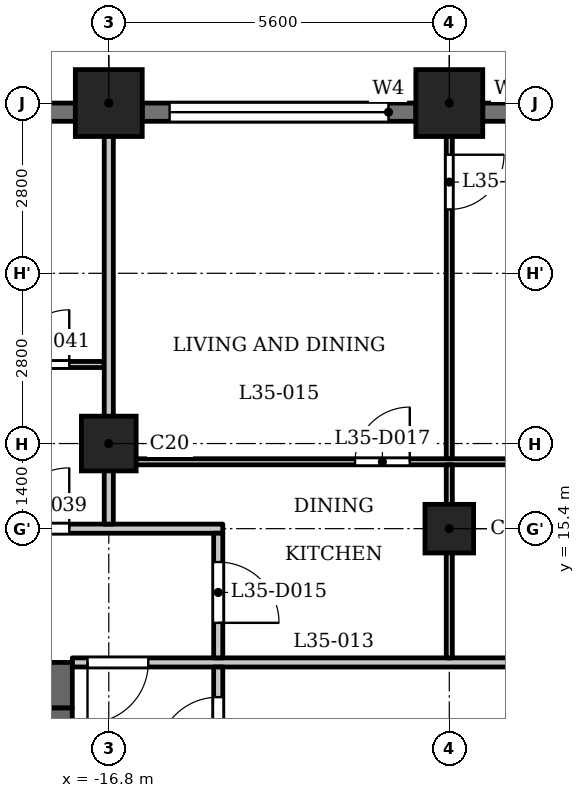
"""IFC4 building model, lengths in metres.
Left out: names, types, materials, properties, quantities, classifications, styles, units other than length and angle.
Written with IfcOpenShell. Run it as: python <this file> out.ifc"""

import sys

from ifc_helpers import new_model, si_unit, direction, frame, frame_2d, origin, origin_2d, place, context, subcontext, project, spatial, rectangle, extrude, element, fill, save


model = new_model("IFC4")
c1 = context("Model", 3, precision=1e-05, world=origin(), true_north=direction((0.0, 1.0)))
c2 = subcontext(c1, "Body", "Model", "MODEL_VIEW")
j1 = project(units=[si_unit("LENGTHUNIT", "METRE"), si_unit("PLANEANGLEUNIT", "RADIAN")], contexts=[c1])
p1 = place(None, origin())
s1 = spatial("IfcSite", under=j1, at=p1, CompositionType="ELEMENT")
p2 = place(p1, origin())
s2 = spatial("IfcBuilding", under=s1, at=p2, CompositionType="ELEMENT")
p3 = place(p2, frame((0.0, 0.0, 139.6)))
s3 = spatial("IfcBuildingStorey", under=s2, at=p3, CompositionType="ELEMENT", Elevation=139.6)
for number, where, z_axis, x_axis in (
    (1, (-11.2, 22.4, 0.0), (0.0, 0.0, 1.0), (1.0, 0.0, 0.0)),
    (2, (-16.8, 22.4, 0.0), (0.0, 0.0, 1.0), (1.0, 0.0, 0.0)),
):
    element("IfcColumn", number, at=place(p3, frame(where, z_axis=z_axis, x_axis=x_axis)), inside=s3, PredefinedType="COLUMN", context=c2, shape_type="SweptSolid", body=[
        extrude(rectangle(XDim=1.1, YDim=1.1, at=origin_2d()), origin(), (0.0, 0.0, 1.0), 3.5),
    ])
p4 = place(p3, frame((-16.8, 16.8, 0.0), z_axis=(0.0, 0.0, 1.0), x_axis=(1.0, 0.0, 0.0)))
e3 = element("IfcColumn", 3, at=p4, inside=s3, PredefinedType="COLUMN", context=c2, shape_type="SweptSolid", body=[
    extrude(rectangle(XDim=0.9, YDim=0.9, at=origin_2d()), origin(), (0.0, 0.0, 1.0), 3.5),
])
p5 = place(p3, frame((-11.2, 15.4, 0.0), z_axis=(0.0, 0.0, 1.0), x_axis=(1.0, 0.0, 0.0)))
e4 = element("IfcColumn", 4, at=p5, inside=s3, PredefinedType="COLUMN", context=c2, shape_type="SweptSolid", body=[
    extrude(rectangle(XDim=0.8, YDim=0.8, at=origin_2d()), origin(), (0.0, 0.0, 1.0), 3.5),
])
p6 = place(p3, frame((-6.15, 22.25, 0.0), z_axis=(0.0, 0.0, 1.0), x_axis=(-1.0, 0.0, 0.0)))
e5 = element("IfcWall", 5, at=p6, inside=s3, PredefinedType="SOLIDWALL", context=c2, shape_type="SweptSolid", body=[
    extrude(rectangle(XDim=4.5, YDim=0.3, at=frame_2d((2.25, 0.0))), origin(), (0.0, 0.0, 1.0), 2.45),
])
p7 = place(p6, frame((0.45, 0.0, 1.2)))
e6 = element("IfcOpeningElement", 6, at=p7, cuts=e5, PredefinedType="OPENING", context=c2, shape_type="SweptSolid", body=[
    extrude(rectangle(XDim=3.6, YDim=0.95, at=frame_2d((1.8, 0.475))), frame((0.0, 0.16, 0.0), z_axis=(0.0, -1.0, 0.0), x_axis=(1.0, 0.0, 0.0)), (0.0, 0.0, 1.0), 0.32),
])
p8 = place(p3, frame((-11.75, 22.25, 0.0), z_axis=(0.0, 0.0, 1.0), x_axis=(-1.0, 0.0, 0.0)))
e7 = element("IfcWall", 7, at=p8, inside=s3, PredefinedType="SOLIDWALL", context=c2, shape_type="SweptSolid", body=[
    extrude(rectangle(XDim=4.5, YDim=0.3, at=frame_2d((2.25, 0.0))), origin(), (0.0, 0.0, 1.0), 2.45),
])
p9 = place(p8, frame((0.45, 0.0, 1.2)))
e8 = element("IfcOpeningElement", 8, at=p9, cuts=e7, PredefinedType="OPENING", context=c2, shape_type="SweptSolid", body=[
    extrude(rectangle(XDim=3.6, YDim=0.95, at=frame_2d((1.8, 0.475))), frame((0.0, 0.16, 0.0), z_axis=(0.0, -1.0, 0.0), x_axis=(1.0, 0.0, 0.0)), (0.0, 0.0, 1.0), 0.32),
])
p10 = place(p3, frame((-17.35, 22.25, 0.0), z_axis=(0.0, 0.0, 1.0), x_axis=(-1.0, 0.0, 0.0)))
e9 = element("IfcWall", 9, at=p10, inside=s3, PredefinedType="SOLIDWALL", context=c2, shape_type="SweptSolid", body=[
    extrude(rectangle(XDim=2.65, YDim=0.3, at=frame_2d((1.325, 0.0))), origin(), (0.0, 0.0, 1.0), 2.45),
])
p11 = place(p10, frame((0.425, 0.0, 0.9)))
e10 = element("IfcOpeningElement", 10, at=p11, cuts=e9, PredefinedType="OPENING", context=c2, shape_type="SweptSolid", body=[
    extrude(rectangle(XDim=1.8, YDim=1.25, at=frame_2d((0.9, 0.625))), frame((0.0, 0.16, 0.0), z_axis=(0.0, -1.0, 0.0), x_axis=(1.0, 0.0, 0.0)), (0.0, 0.0, 1.0), 0.32),
])
p12 = place(p3, frame((-17.4, 12.825, 0.0), z_axis=(0.0, 0.0, 1.0), x_axis=(-1.0, 0.0, 0.0)))
e11 = element("IfcWall", 11, at=p12, inside=s3, PredefinedType="SHEAR", context=c2, shape_type="SweptSolid", body=[
    extrude(rectangle(XDim=10.4, YDim=0.75, at=frame_2d((5.2, 0.0))), origin(), (0.0, 0.0, 1.0), 3.2),
])
p13 = place(p3, frame((-17.6, -12.45, 0.0), z_axis=(0.0, 0.0, 1.0), x_axis=(0.0, 1.0, 0.0)))
e12 = element("IfcWall", 12, at=p13, inside=s3, PredefinedType="SHEAR", context=c2, shape_type="SweptSolid", body=[
    extrude(rectangle(XDim=24.9, YDim=0.4, at=frame_2d((12.45, 0.0))), origin(), (0.0, 0.0, 1.0), 3.2),
])
p14 = place(p13, frame((8.65, 0.0, 0.0)))
e13 = element("IfcOpeningElement", 13, at=p14, cuts=e12, PredefinedType="OPENING", context=c2, shape_type="SweptSolid", body=[
    extrude(rectangle(XDim=0.9, YDim=2.1, at=frame_2d((0.45, 1.05))), frame((0.0, 0.21, 0.0), z_axis=(0.0, -1.0, 0.0), x_axis=(1.0, 0.0, 0.0)), (0.0, 0.0, 1.0), 0.42),
])
p15 = place(p13, frame((15.6, 0.0, 0.0)))
e14 = element("IfcOpeningElement", 14, at=p15, cuts=e12, PredefinedType="OPENING", context=c2, shape_type="SweptSolid", body=[
    extrude(rectangle(XDim=1.1, YDim=2.1, at=frame_2d((0.55, 1.05))), frame((0.0, 0.21, 0.0), z_axis=(0.0, -1.0, 0.0), x_axis=(1.0, 0.0, 0.0)), (0.0, 0.0, 1.0), 0.42),
])
p16 = place(p13, frame((18.0, 0.0, 0.0)))
e15 = element("IfcOpeningElement", 15, at=p16, cuts=e12, PredefinedType="OPENING", context=c2, shape_type="SweptSolid", body=[
    extrude(rectangle(XDim=1.1, YDim=2.1, at=frame_2d((0.55, 1.05))), frame((0.0, 0.21, 0.0), z_axis=(0.0, -1.0, 0.0), x_axis=(1.0, 0.0, 0.0)), (0.0, 0.0, 1.0), 0.42),
])
p17 = place(p13, frame((23.025, 0.0, 0.0)))
e16 = element("IfcOpeningElement", 16, at=p17, cuts=e12, PredefinedType="OPENING", context=c2, shape_type="SweptSolid", body=[
    extrude(rectangle(XDim=1.1, YDim=2.1, at=frame_2d((0.55, 1.05))), frame((0.0, 0.21, 0.0), z_axis=(0.0, -1.0, 0.0), x_axis=(1.0, 0.0, 0.0)), (0.0, 0.0, 1.0), 0.42),
])
p18 = place(p13, frame((0.775, 0.0, 0.0)))
e17 = element("IfcOpeningElement", 17, at=p18, cuts=e12, PredefinedType="OPENING", context=c2, shape_type="SweptSolid", body=[
    extrude(rectangle(XDim=1.1, YDim=2.1, at=frame_2d((0.55, 1.05))), frame((0.0, 0.21, 0.0), z_axis=(0.0, -1.0, 0.0), x_axis=(1.0, 0.0, 0.0)), (0.0, 0.0, 1.0), 0.42),
])
p19 = place(p13, frame((12.925, 0.0, 0.0)))
e18 = element("IfcOpeningElement", 18, at=p19, cuts=e12, PredefinedType="OPENING", context=c2, shape_type="SweptSolid", body=[
    extrude(rectangle(XDim=1.8, YDim=2.1, at=frame_2d((0.9, 1.05))), frame((0.0, 0.21, 0.0), z_axis=(0.0, -1.0, 0.0), x_axis=(1.0, 0.0, 0.0)), (0.0, 0.0, 1.0), 0.42),
])
p20 = place(p3, frame((-17.4, 13.2, 0.0), z_axis=(0.0, 0.0, 1.0), x_axis=(1.0, 0.0, 0.0)))
e19 = element("IfcWall", 19, at=p20, inside=s3, PredefinedType="PARTITIONING", context=c2, shape_type="SweptSolid", body=[
    extrude(rectangle(XDim=34.8, YDim=0.15, at=frame_2d((17.4, 0.0))), origin(), (0.0, 0.0, 1.0), 3.2),
])
p21 = place(p20, frame((0.25, 0.0, 0.0)))
e20 = element("IfcOpeningElement", 20, at=p21, cuts=e19, PredefinedType="OPENING", context=c2, shape_type="SweptSolid", body=[
    extrude(rectangle(XDim=1.0, YDim=2.1, at=frame_2d((0.5, 1.05))), frame((0.0, 0.085, 0.0), z_axis=(0.0, -1.0, 0.0), x_axis=(1.0, 0.0, 0.0)), (0.0, 0.0, 1.0), 0.17),
])
p22 = place(p20, frame((33.65, 0.0, 0.0)))
e21 = element("IfcOpeningElement", 21, at=p22, cuts=e19, PredefinedType="OPENING", context=c2, shape_type="SweptSolid", body=[
    extrude(rectangle(XDim=1.0, YDim=2.1, at=frame_2d((0.5, 1.05))), frame((0.0, 0.085, 0.0), z_axis=(0.0, -1.0, 0.0), x_axis=(1.0, 0.0, 0.0)), (0.0, 0.0, 1.0), 0.17),
])
p23 = place(p20, frame((15.75, 0.0, 0.0)))
e22 = element("IfcOpeningElement", 22, at=p23, cuts=e19, PredefinedType="OPENING", context=c2, shape_type="SweptSolid", body=[
    extrude(rectangle(XDim=1.0, YDim=2.1, at=frame_2d((0.5, 1.05))), frame((0.0, 0.085, 0.0), z_axis=(0.0, -1.0, 0.0), x_axis=(1.0, 0.0, 0.0)), (0.0, 0.0, 1.0), 0.17),
])
p24 = place(p20, frame((19.35, 0.0, 0.0)))
e23 = element("IfcOpeningElement", 23, at=p24, cuts=e19, PredefinedType="OPENING", context=c2, shape_type="SweptSolid", body=[
    extrude(rectangle(XDim=1.0, YDim=2.1, at=frame_2d((0.5, 1.05))), frame((0.0, 0.085, 0.0), z_axis=(0.0, -1.0, 0.0), x_axis=(1.0, 0.0, 0.0)), (0.0, 0.0, 1.0), 0.17),
])
p25 = place(p20, frame((26.95, 0.0, 0.0)))
e24 = element("IfcOpeningElement", 24, at=p25, cuts=e19, PredefinedType="OPENING", context=c2, shape_type="SweptSolid", body=[
    extrude(rectangle(XDim=1.0, YDim=2.1, at=frame_2d((0.5, 1.05))), frame((0.0, 0.085, 0.0), z_axis=(0.0, -1.0, 0.0), x_axis=(1.0, 0.0, 0.0)), (0.0, 0.0, 1.0), 0.17),
])
p26 = place(p20, frame((29.75, 0.0, 0.0)))
e25 = element("IfcOpeningElement", 25, at=p26, cuts=e19, PredefinedType="OPENING", context=c2, shape_type="SweptSolid", body=[
    extrude(rectangle(XDim=1.0, YDim=2.1, at=frame_2d((0.5, 1.05))), frame((0.0, 0.085, 0.0), z_axis=(0.0, -1.0, 0.0), x_axis=(1.0, 0.0, 0.0)), (0.0, 0.0, 1.0), 0.17),
])
p27 = place(p3, frame((-27.484, 15.4, 0.0), z_axis=(0.0, 0.0, 1.0), x_axis=(1.0, 0.0, 0.0)))
e26 = element("IfcWall", 26, at=p27, inside=s3, PredefinedType="PARTITIONING", context=c2, shape_type="SweptSolid", body=[
    extrude(rectangle(XDim=12.559, YDim=0.15, at=frame_2d((6.279, 0.0))), origin(), (0.0, 0.0, 1.0), 3.2),
])
p28 = place(p27, frame((9.034, 0.0, 0.0)))
e27 = element("IfcOpeningElement", 27, at=p28, cuts=e26, PredefinedType="OPENING", context=c2, shape_type="SweptSolid", body=[
    extrude(rectangle(XDim=1.0, YDim=2.1, at=frame_2d((0.5, 1.05))), frame((0.0, 0.085, 0.0), z_axis=(0.0, -1.0, 0.0), x_axis=(1.0, 0.0, 0.0)), (0.0, 0.0, 1.0), 0.17),
])
p29 = place(p3, frame((-16.725, 16.5, 0.0), z_axis=(0.0, 0.0, 1.0), x_axis=(1.0, 0.0, 0.0)))
e28 = element("IfcWall", 28, at=p29, inside=s3, PredefinedType="PARTITIONING", context=c2, shape_type="SweptSolid", body=[
    extrude(rectangle(XDim=33.45, YDim=0.1, at=frame_2d((16.725, 0.0))), origin(), (0.0, 0.0, 1.0), 3.2),
])
p30 = place(p29, frame((9.675, 0.0, 0.0)))
e29 = element("IfcOpeningElement", 29, at=p30, cuts=e28, PredefinedType="OPENING", context=c2, shape_type="SweptSolid", body=[
    extrude(rectangle(XDim=0.8, YDim=2.1, at=frame_2d((0.4, 1.05))), frame((0.0, 0.06, 0.0), z_axis=(0.0, -1.0, 0.0), x_axis=(1.0, 0.0, 0.0)), (0.0, 0.0, 1.0), 0.12),
])
p31 = place(p29, frame((3.975, 0.0, 0.0)))
e30 = element("IfcOpeningElement", 30, at=p31, cuts=e28, PredefinedType="OPENING", context=c2, shape_type="SweptSolid", body=[
    extrude(rectangle(XDim=0.9, YDim=2.1, at=frame_2d((0.45, 1.05))), frame((0.0, 0.06, 0.0), z_axis=(0.0, -1.0, 0.0), x_axis=(1.0, 0.0, 0.0)), (0.0, 0.0, 1.0), 0.12),
])
p32 = place(p29, frame((12.025, 0.0, 0.0)))
e31 = element("IfcOpeningElement", 31, at=p32, cuts=e28, PredefinedType="OPENING", context=c2, shape_type="SweptSolid", body=[
    extrude(rectangle(XDim=0.8, YDim=2.1, at=frame_2d((0.4, 1.05))), frame((0.0, 0.06, 0.0), z_axis=(0.0, -1.0, 0.0), x_axis=(1.0, 0.0, 0.0)), (0.0, 0.0, 1.0), 0.12),
])
p33 = place(p29, frame((15.175, 0.0, 0.0)))
e32 = element("IfcOpeningElement", 32, at=p33, cuts=e28, PredefinedType="OPENING", context=c2, shape_type="SweptSolid", body=[
    extrude(rectangle(XDim=0.9, YDim=2.1, at=frame_2d((0.45, 1.05))), frame((0.0, 0.06, 0.0), z_axis=(0.0, -1.0, 0.0), x_axis=(1.0, 0.0, 0.0)), (0.0, 0.0, 1.0), 0.12),
])
p34 = place(p29, frame((20.975, 0.0, 0.0)))
e33 = element("IfcOpeningElement", 33, at=p34, cuts=e28, PredefinedType="OPENING", context=c2, shape_type="SweptSolid", body=[
    extrude(rectangle(XDim=0.8, YDim=2.1, at=frame_2d((0.4, 1.05))), frame((0.0, 0.06, 0.0), z_axis=(0.0, -1.0, 0.0), x_axis=(1.0, 0.0, 0.0)), (0.0, 0.0, 1.0), 0.12),
])
p35 = place(p29, frame((18.175, 0.0, 0.0)))
e34 = element("IfcOpeningElement", 34, at=p35, cuts=e28, PredefinedType="OPENING", context=c2, shape_type="SweptSolid", body=[
    extrude(rectangle(XDim=0.9, YDim=2.1, at=frame_2d((0.45, 1.05))), frame((0.0, 0.06, 0.0), z_axis=(0.0, -1.0, 0.0), x_axis=(1.0, 0.0, 0.0)), (0.0, 0.0, 1.0), 0.12),
])
p36 = place(p29, frame((23.725, 0.0, 0.0)))
e35 = element("IfcOpeningElement", 35, at=p36, cuts=e28, PredefinedType="OPENING", context=c2, shape_type="SweptSolid", body=[
    extrude(rectangle(XDim=0.8, YDim=2.1, at=frame_2d((0.4, 1.05))), frame((0.0, 0.06, 0.0), z_axis=(0.0, -1.0, 0.0), x_axis=(1.0, 0.0, 0.0)), (0.0, 0.0, 1.0), 0.12),
])
p37 = place(p29, frame((26.125, 0.0, 0.0)))
e36 = element("IfcOpeningElement", 36, at=p37, cuts=e28, PredefinedType="OPENING", context=c2, shape_type="SweptSolid", body=[
    extrude(rectangle(XDim=0.9, YDim=2.1, at=frame_2d((0.45, 1.05))), frame((0.0, 0.06, 0.0), z_axis=(0.0, -1.0, 0.0), x_axis=(1.0, 0.0, 0.0)), (0.0, 0.0, 1.0), 0.12),
])
p38 = place(p29, frame((32.125, 0.0, 0.0)))
e37 = element("IfcOpeningElement", 37, at=p38, cuts=e28, PredefinedType="OPENING", context=c2, shape_type="SweptSolid", body=[
    extrude(rectangle(XDim=0.8, YDim=2.1, at=frame_2d((0.4, 1.05))), frame((0.0, 0.06, 0.0), z_axis=(0.0, -1.0, 0.0), x_axis=(1.0, 0.0, 0.0)), (0.0, 0.0, 1.0), 0.12),
])
p39 = place(p29, frame((28.975, 0.0, 0.0)))
e38 = element("IfcOpeningElement", 38, at=p39, cuts=e28, PredefinedType="OPENING", context=c2, shape_type="SweptSolid", body=[
    extrude(rectangle(XDim=0.9, YDim=2.1, at=frame_2d((0.45, 1.05))), frame((0.0, 0.06, 0.0), z_axis=(0.0, -1.0, 0.0), x_axis=(1.0, 0.0, 0.0)), (0.0, 0.0, 1.0), 0.12),
])
p40 = place(p3, frame((-26.44, 18.1, 0.0), z_axis=(0.0, 0.0, 1.0), x_axis=(1.0, 0.0, 0.0)))
e39 = element("IfcWall", 39, at=p40, inside=s3, PredefinedType="PARTITIONING", context=c2, shape_type="SweptSolid", body=[
    extrude(rectangle(XDim=9.565, YDim=0.1, at=frame_2d((4.782, 0.0))), origin(), (0.0, 0.0, 1.0), 3.2),
])
p41 = place(p40, frame((2.626, 0.0, 0.0)))
e40 = element("IfcOpeningElement", 40, at=p41, cuts=e39, PredefinedType="OPENING", context=c2, shape_type="SweptSolid", body=[
    extrude(rectangle(XDim=0.8, YDim=2.1, at=frame_2d((0.4, 1.05))), frame((0.0, 0.06, 0.0), z_axis=(0.0, -1.0, 0.0), x_axis=(1.0, 0.0, 0.0)), (0.0, 0.0, 1.0), 0.12),
])
p42 = place(p40, frame((8.09, 0.0, 0.0)))
e41 = element("IfcOpeningElement", 41, at=p42, cuts=e39, PredefinedType="OPENING", context=c2, shape_type="SweptSolid", body=[
    extrude(rectangle(XDim=0.9, YDim=2.1, at=frame_2d((0.45, 1.05))), frame((0.0, 0.06, 0.0), z_axis=(0.0, -1.0, 0.0), x_axis=(1.0, 0.0, 0.0)), (0.0, 0.0, 1.0), 0.12),
])
p43 = place(p3, frame((-16.8, 15.475, 0.0), z_axis=(0.0, 0.0, 1.0), x_axis=(0.0, 1.0, 0.0)))
e42 = element("IfcWall", 42, at=p43, inside=s3, PredefinedType="PARTITIONING", context=c2, shape_type="SweptSolid", body=[
    extrude(rectangle(XDim=7.455, YDim=0.15, at=frame_2d((3.728, 0.0))), origin(), (0.0, 0.0, 1.0), 3.2),
])
p44 = place(p3, frame((-15.0, 6.769, 0.0), z_axis=(0.0, 0.0, 1.0), x_axis=(0.0, 1.0, 0.0)))
e43 = element("IfcWall", 43, at=p44, inside=s3, PredefinedType="PARTITIONING", context=c2, shape_type="SweptSolid", body=[
    extrude(rectangle(XDim=6.356, YDim=0.15, at=frame_2d((3.178, 0.0))), origin(), (0.0, 0.0, 1.0), 3.2),
])
p45 = place(p44, frame((4.86, 0.0, 0.0)))
e44 = element("IfcOpeningElement", 44, at=p45, cuts=e43, PredefinedType="OPENING", context=c2, shape_type="SweptSolid", body=[
    extrude(rectangle(XDim=1.0, YDim=2.1, at=frame_2d((0.5, 1.05))), frame((0.0, 0.085, 0.0), z_axis=(0.0, -1.0, 0.0), x_axis=(1.0, 0.0, 0.0)), (0.0, 0.0, 1.0), 0.17),
])
p46 = place(p3, frame((-15.0, 13.275, 0.0), z_axis=(0.0, 0.0, 1.0), x_axis=(0.0, 1.0, 0.0)))
e45 = element("IfcWall", 45, at=p46, inside=s3, PredefinedType="PARTITIONING", context=c2, shape_type="SweptSolid", body=[
    extrude(rectangle(XDim=2.05, YDim=0.15, at=frame_2d((1.025, 0.0))), origin(), (0.0, 0.0, 1.0), 3.2),
])
p47 = place(p46, frame((0.576, 0.0, 0.0)))
e46 = element("IfcOpeningElement", 46, at=p47, cuts=e45, PredefinedType="OPENING", context=c2, shape_type="SweptSolid", body=[
    extrude(rectangle(XDim=1.0, YDim=2.1, at=frame_2d((0.5, 1.05))), frame((0.0, 0.085, 0.0), z_axis=(0.0, -1.0, 0.0), x_axis=(1.0, 0.0, 0.0)), (0.0, 0.0, 1.0), 0.17),
])
p48 = place(p3, frame((-11.2, 13.275, 0.0), z_axis=(0.0, 0.0, 1.0), x_axis=(0.0, 1.0, 0.0)))
e47 = element("IfcWall", 47, at=p48, inside=s3, PredefinedType="PARTITIONING", context=c2, shape_type="SweptSolid", body=[
    extrude(rectangle(XDim=3.175, YDim=0.1, at=frame_2d((1.587, 0.0))), origin(), (0.0, 0.0, 1.0), 3.2),
])
p49 = place(p3, frame((-11.2, 16.55, 0.0), z_axis=(0.0, 0.0, 1.0), x_axis=(0.0, 1.0, 0.0)))
e48 = element("IfcWall", 48, at=p49, inside=s3, PredefinedType="PARTITIONING", context=c2, shape_type="SweptSolid", body=[
    extrude(rectangle(XDim=6.38, YDim=0.1, at=frame_2d((3.19, 0.0))), origin(), (0.0, 0.0, 1.0), 3.2),
])
p50 = place(p49, frame((4.1, 0.0, 0.0)))
e49 = element("IfcOpeningElement", 49, at=p50, cuts=e48, PredefinedType="OPENING", context=c2, shape_type="SweptSolid", body=[
    extrude(rectangle(XDim=0.9, YDim=2.1, at=frame_2d((0.45, 1.05))), frame((0.0, 0.06, 0.0), z_axis=(0.0, -1.0, 0.0), x_axis=(1.0, 0.0, 0.0)), (0.0, 0.0, 1.0), 0.12),
])
p51 = place(p45, origin())
e50 = element("IfcDoor", 50, at=p51, inside=s3, OperationType="SINGLE_SWING_RIGHT", PredefinedType="DOOR", context=c2, shape_type="SweptSolid", body=[
    extrude(rectangle(XDim=1.0, YDim=2.1, at=frame_2d((0.5, 1.05))), frame((0.0, 0.025, 0.0), z_axis=(0.0, -1.0, 0.0), x_axis=(1.0, 0.0, 0.0)), (0.0, 0.0, 1.0), 0.05),
])
fill(e44, e50)
p52 = place(p21, origin())
e51 = element("IfcDoor", 51, at=p52, inside=s3, OperationType="SINGLE_SWING_LEFT", PredefinedType="DOOR", context=c2, shape_type="SweptSolid", body=[
    extrude(rectangle(XDim=1.0, YDim=2.1, at=frame_2d((0.5, 1.05))), frame((0.0, 0.025, 0.0), z_axis=(0.0, -1.0, 0.0), x_axis=(1.0, 0.0, 0.0)), (0.0, 0.0, 1.0), 0.05),
])
fill(e20, e51)
p53 = place(p47, origin())
e52 = element("IfcDoor", 52, at=p53, inside=s3, OperationType="SINGLE_SWING_LEFT", PredefinedType="DOOR", context=c2, shape_type="SweptSolid", body=[
    extrude(rectangle(XDim=1.0, YDim=2.1, at=frame_2d((0.5, 1.05))), frame((0.0, 0.025, 0.0), z_axis=(0.0, -1.0, 0.0), x_axis=(1.0, 0.0, 0.0)), (0.0, 0.0, 1.0), 0.05),
])
fill(e46, e52)
p54 = place(p31, origin())
e53 = element("IfcDoor", 53, at=p54, inside=s3, OperationType="SINGLE_SWING_LEFT", PredefinedType="DOOR", context=c2, shape_type="SweptSolid", body=[
    extrude(rectangle(XDim=0.9, YDim=2.1, at=frame_2d((0.45, 1.05))), frame((0.0, 0.025, 0.0), z_axis=(0.0, -1.0, 0.0), x_axis=(1.0, 0.0, 0.0)), (0.0, 0.0, 1.0), 0.05),
])
fill(e30, e53)
p55 = place(p50, origin())
e54 = element("IfcDoor", 54, at=p55, inside=s3, OperationType="SINGLE_SWING_RIGHT", PredefinedType="DOOR", context=c2, shape_type="SweptSolid", body=[
    extrude(rectangle(XDim=0.9, YDim=2.1, at=frame_2d((0.45, 1.05))), frame((0.0, 0.025, 0.0), z_axis=(0.0, -1.0, 0.0), x_axis=(1.0, 0.0, 0.0)), (0.0, 0.0, 1.0), 0.05),
])
fill(e49, e54)
p56 = place(p28, origin())
e55 = element("IfcDoor", 55, at=p56, inside=s3, OperationType="SINGLE_SWING_LEFT", PredefinedType="DOOR", context=c2, shape_type="SweptSolid", body=[
    extrude(rectangle(XDim=1.0, YDim=2.1, at=frame_2d((0.5, 1.05))), frame((0.0, 0.025, 0.0), z_axis=(0.0, -1.0, 0.0), x_axis=(1.0, 0.0, 0.0)), (0.0, 0.0, 1.0), 0.05),
])
fill(e27, e55)
p57 = place(p42, origin())
e56 = element("IfcDoor", 56, at=p57, inside=s3, OperationType="SINGLE_SWING_LEFT", PredefinedType="DOOR", context=c2, shape_type="SweptSolid", body=[
    extrude(rectangle(XDim=0.9, YDim=2.1, at=frame_2d((0.45, 1.05))), frame((0.0, 0.025, 0.0), z_axis=(0.0, -1.0, 0.0), x_axis=(1.0, 0.0, 0.0)), (0.0, 0.0, 1.0), 0.05),
])
fill(e41, e56)
p58 = place(p9, origin())
e57 = element("IfcWindow", 57, at=p58, inside=s3, PartitioningType="SINGLE_PANEL", PredefinedType="WINDOW", context=c2, shape_type="SweptSolid", body=[
    extrude(rectangle(XDim=3.6, YDim=0.95, at=frame_2d((1.8, 0.475))), frame((0.0, 0.03, 0.0), z_axis=(0.0, -1.0, 0.0), x_axis=(1.0, 0.0, 0.0)), (0.0, 0.0, 1.0), 0.06),
])
fill(e8, e57)
save(model, sys.argv[1])
